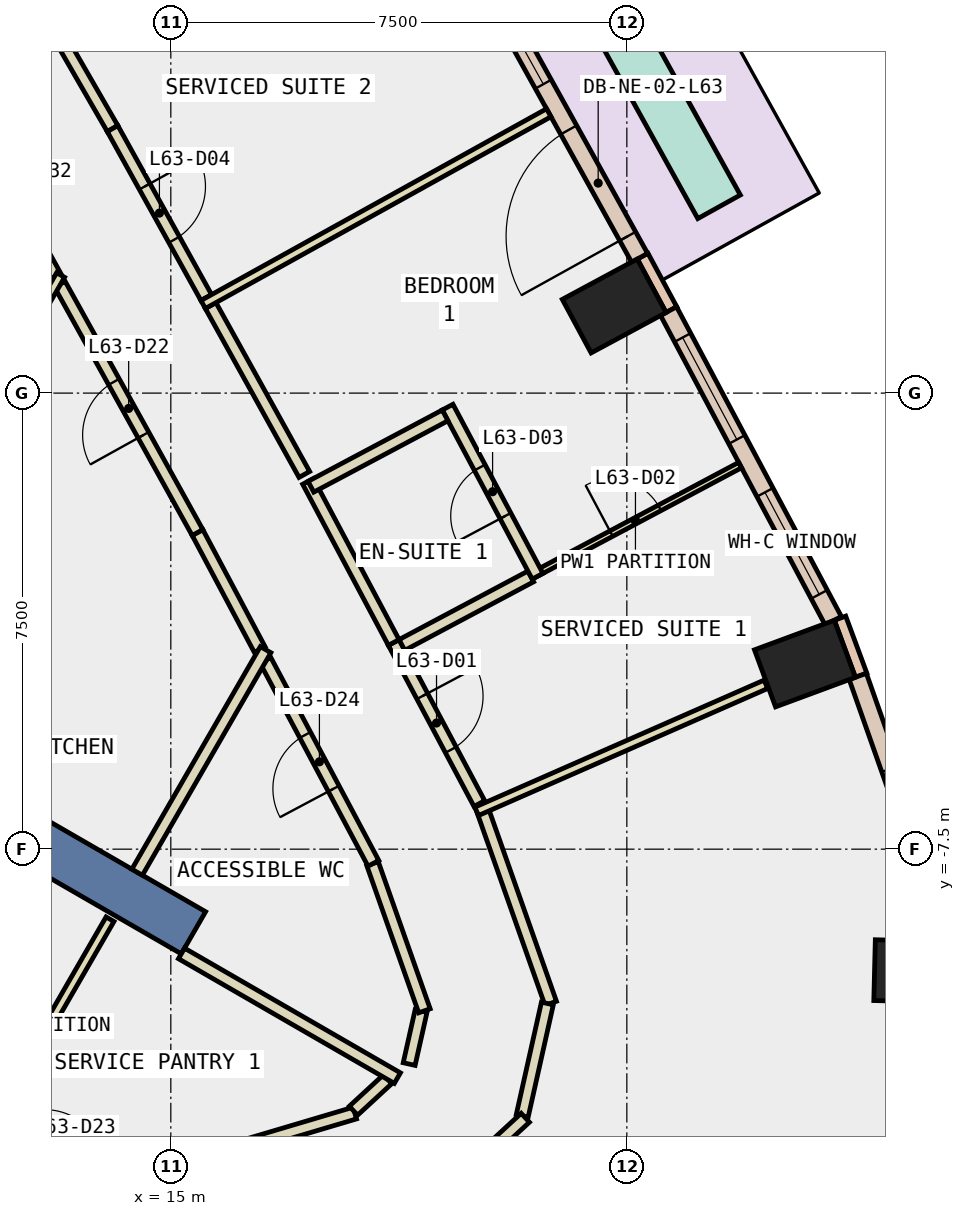
"""IFC4 building model, lengths in metres.
Left out: names, types, materials, properties, quantities, classifications, styles, units other than length and angle.
Written with IfcOpenShell. Run it as: python <this file> out.ifc"""

import sys

from ifc_helpers import new_model, si_unit, direction, frame, frame_2d, origin, origin_2d, place, context, subcontext, project, spatial, rectangle, extrude, element, fill, save


model = new_model("IFC4")
c1 = context("Model", 3, precision=1e-05, world=origin(), true_north=direction((0.0, 1.0)))
c2 = subcontext(c1, "Body", "Model", "MODEL_VIEW")
j1 = project(units=[si_unit("LENGTHUNIT", "METRE"), si_unit("PLANEANGLEUNIT", "RADIAN")], contexts=[c1])
p1 = place(None, origin())
s1 = spatial("IfcSite", under=j1, at=p1, CompositionType="ELEMENT")
p2 = place(p1, origin())
s2 = spatial("IfcBuilding", under=s1, at=p2, CompositionType="ELEMENT")
p3 = place(p2, frame((0.0, 0.0, 273.8)))
s3 = spatial("IfcBuildingStorey", under=s2, at=p3, CompositionType="ELEMENT", Elevation=273.8)
for number, where, z_axis, x_axis in (
    (1, (27.274, -9.507, -0.34), (0.0, 0.0, 1.0), (0.025, 1.0, 0.0)),
    (2, (25.429, -4.448, -0.34), (0.0, 0.0, 1.0), (-0.347, 0.938, 0.0)),
    (3, (22.292, 1.433, -0.34), (0.0, 0.0, 1.0), (-0.474, 0.881, 0.0)),
):
    element("IfcColumn", number, at=place(p3, frame(where, z_axis=z_axis, x_axis=x_axis)), inside=s3, PredefinedType="COLUMN", context=c2, shape_type="SweptSolid", body=[
        extrude(rectangle(XDim=1.0, YDim=1.4, at=origin_2d()), origin(), (0.0, 0.0, 1.0), 3.6),
    ])
p4 = place(p3, frame((7.578, -4.375, -0.34), z_axis=(0.0, 0.0, 1.0), x_axis=(0.866024315419, -0.5000018851, 0.0)))
e4 = element("IfcWall", 4, at=p4, inside=s3, PredefinedType="SHEAR", context=c2, shape_type="SweptSolid", body=[
    extrude(rectangle(XDim=9.0, YDim=0.8, at=frame_2d((4.5, 0.0))), origin(), (0.0, 0.0, 1.0), 3.6),
])
p5 = place(p3, frame((26.353, -4.64, 0.0), z_axis=(0.0, 0.0, 1.0), x_axis=(-0.346892928577, 0.937904737222, 0.0)))
e5 = element("IfcWall", 5, at=p5, inside=s3, PredefinedType="STANDARD", context=c2, shape_type="SweptSolid", body=[
    extrude(rectangle(XDim=1.0, YDim=0.2, at=frame_2d((0.5, 0.0))), origin(), (0.0, 0.0, 1.0), 3.26),
])
p6 = place(p3, frame((23.233, 1.372, 0.0), z_axis=(0.0, 0.0, 1.0), x_axis=(-0.473765014438, 0.880651299377, 0.0)))
e6 = element("IfcWall", 6, at=p6, inside=s3, PredefinedType="STANDARD", context=c2, shape_type="SweptSolid", body=[
    extrude(rectangle(XDim=1.0, YDim=0.2, at=frame_2d((0.5, 0.0))), origin(), (0.0, 0.0, 1.0), 3.26),
])
p7 = place(p3, frame((27.836, -9.021, 0.0), z_axis=(0.0, 0.0, 1.0), x_axis=(-0.332491532378, 0.943106240514, 0.0)))
e7 = element("IfcWall", 7, at=p7, inside=s3, PredefinedType="STANDARD", context=c2, shape_type="SweptSolid", body=[
    extrude(rectangle(XDim=4.625, YDim=0.3, at=frame_2d((2.312, 0.0))), origin(), (0.0, 0.0, 1.0), 3.26),
])
p8 = place(p7, frame((1.613, 0.0, 0.9)))
e8 = element("IfcOpeningElement", 8, at=p8, cuts=e7, PredefinedType="OPENING", context=c2, shape_type="SweptSolid", body=[
    extrude(rectangle(XDim=1.4, YDim=2.0, at=frame_2d((0.7, 1.0))), frame((0.0, 0.16, 0.0), z_axis=(0.0, -1.0, 0.0), x_axis=(1.0, 0.0, 0.0)), (0.0, 0.0, 1.0), 0.32),
])
p9 = place(p3, frame((25.895, -3.744, 0.0), z_axis=(0.0, 0.0, 1.0), x_axis=(-0.469691596427, 0.882830563724, 0.0)))
e9 = element("IfcWall", 9, at=p9, inside=s3, PredefinedType="STANDARD", context=c2, shape_type="SweptSolid", body=[
    extrude(rectangle(XDim=5.768, YDim=0.3, at=frame_2d((2.884, 0.0))), origin(), (0.0, 0.0, 1.0), 3.26),
])
p10 = place(p9, frame((0.492, 0.0, 0.9)))
e10 = element("IfcOpeningElement", 10, at=p10, cuts=e9, PredefinedType="OPENING", context=c2, shape_type="SweptSolid", body=[
    extrude(rectangle(XDim=1.9, YDim=2.0, at=frame_2d((0.95, 1.0))), frame((0.0, 0.16, 0.0), z_axis=(0.0, -1.0, 0.0), x_axis=(1.0, 0.0, 0.0)), (0.0, 0.0, 1.0), 0.32),
])
p11 = place(p9, frame((3.376, 0.0, 0.9)))
e11 = element("IfcOpeningElement", 11, at=p11, cuts=e9, PredefinedType="OPENING", context=c2, shape_type="SweptSolid", body=[
    extrude(rectangle(XDim=1.9, YDim=2.0, at=frame_2d((0.95, 1.0))), frame((0.0, 0.16, 0.0), z_axis=(0.0, -1.0, 0.0), x_axis=(1.0, 0.0, 0.0)), (0.0, 0.0, 1.0), 0.32),
])
p12 = place(p3, frame((22.71, 2.225, 0.0), z_axis=(0.0, 0.0, 1.0), x_axis=(-0.485049005017, 0.874486971162, 0.0)))
e12 = element("IfcWall", 12, at=p12, inside=s3, PredefinedType="STANDARD", context=c2, shape_type="SweptSolid", body=[
    extrude(rectangle(XDim=5.62, YDim=0.3, at=frame_2d((2.81, 0.0))), origin(), (0.0, 0.0, 1.0), 3.26),
])
p13 = place(p12, frame((0.405, 0.0, 0.0)))
e13 = element("IfcOpeningElement", 13, at=p13, cuts=e12, PredefinedType="OPENING", context=c2, shape_type="SweptSolid", body=[
    extrude(rectangle(XDim=2.0, YDim=2.4, at=frame_2d((1.0, 1.2))), frame((0.0, 0.16, 0.0), z_axis=(0.0, -1.0, 0.0), x_axis=(1.0, 0.0, 0.0)), (0.0, 0.0, 1.0), 0.32),
])
p14 = place(p12, frame((3.265, 0.0, 0.9)))
e14 = element("IfcOpeningElement", 14, at=p14, cuts=e12, PredefinedType="OPENING", context=c2, shape_type="SweptSolid", body=[
    extrude(rectangle(XDim=1.9, YDim=2.0, at=frame_2d((0.95, 1.0))), frame((0.0, 0.16, 0.0), z_axis=(0.0, -1.0, 0.0), x_axis=(1.0, 0.0, 0.0)), (0.0, 0.0, 1.0), 0.32),
])
p15 = place(p3, frame((24.017, 3.064, 0.0), z_axis=(0.0, 0.0, 1.0), x_axis=(-0.485053879715, 0.87448426731, 0.0)))
e15 = element("IfcWall", 15, at=p15, inside=s3, PredefinedType="STANDARD", context=c2, shape_type="SweptSolid", body=[
    extrude(rectangle(XDim=5.42, YDim=0.8, at=frame_2d((2.71, 0.0))), origin(), (0.0, 0.0, 1.0), 0.8),
])
p16 = place(p3, frame((13.102, 1.921, 0.0), z_axis=(0.0, 0.0, 1.0), x_axis=(-0.485065409582, 0.874477871891, 0.0)))
e16 = element("IfcWall", 16, at=p16, inside=s3, PredefinedType="PARTITIONING", context=c2, shape_type="SweptSolid", body=[
    extrude(rectangle(XDim=1.651, YDim=0.2, at=frame_2d((0.826, 0.0))), origin(), (0.0, 0.0, 1.0), 3.26),
])
p17 = place(p16, frame((0.325, 0.0, 0.0)))
e17 = element("IfcOpeningElement", 17, at=p17, cuts=e16, PredefinedType="OPENING", context=c2, shape_type="SweptSolid", body=[
    extrude(rectangle(XDim=1.0, YDim=2.1, at=frame_2d((0.5, 1.05))), frame((0.0, 0.11, 0.0), z_axis=(0.0, -1.0, 0.0), x_axis=(1.0, 0.0, 0.0)), (0.0, 0.0, 1.0), 0.22),
])
p18 = place(p3, frame((16.462, -4.217, 0.0), z_axis=(0.0, 0.0, 1.0), x_axis=(-0.469436447461, 0.882966263113, 0.0)))
e18 = element("IfcWall", 18, at=p18, inside=s3, PredefinedType="PARTITIONING", context=c2, shape_type="SweptSolid", body=[
    extrude(rectangle(XDim=2.179, YDim=0.2, at=frame_2d((1.09, 0.0))), origin(), (0.0, 0.0, 1.0), 3.26),
])
p19 = place(p3, frame((15.439, -2.293, 0.0), z_axis=(0.0, 0.0, 1.0), x_axis=(-0.485079003918, 0.874470331091, 0.0)))
e19 = element("IfcWall", 19, at=p19, inside=s3, PredefinedType="PARTITIONING", context=c2, shape_type="SweptSolid", body=[
    extrude(rectangle(XDim=4.669, YDim=0.2, at=frame_2d((2.334, 0.0))), origin(), (0.0, 0.0, 1.0), 3.26),
])
p20 = place(p19, frame((1.834, 0.0, 0.0)))
e20 = element("IfcOpeningElement", 20, at=p20, cuts=e19, PredefinedType="OPENING", context=c2, shape_type="SweptSolid", body=[
    extrude(rectangle(XDim=1.0, YDim=2.1, at=frame_2d((0.5, 1.05))), frame((0.0, 0.11, 0.0), z_axis=(0.0, -1.0, 0.0), x_axis=(1.0, 0.0, 0.0)), (0.0, 0.0, 1.0), 0.22),
])
p21 = place(p3, frame((15.177, -12.686, 0.0), z_axis=(0.0, 0.0, 1.0), x_axis=(0.958629704259, 0.284656090947, 0.0)))
e21 = element("IfcWall", 21, at=p21, inside=s3, PredefinedType="PARTITIONING", context=c2, shape_type="SweptSolid", body=[
    extrude(rectangle(XDim=2.972, YDim=0.2, at=frame_2d((1.486, 0.0))), origin(), (0.0, 0.0, 1.0), 3.26),
])
p22 = place(p3, frame((18.004, -11.801, 0.0), z_axis=(0.0, 0.0, 1.0), x_axis=(0.735268601872, 0.677775835436, 0.0)))
e22 = element("IfcWall", 22, at=p22, inside=s3, PredefinedType="PARTITIONING", context=c2, shape_type="SweptSolid", body=[
    extrude(rectangle(XDim=0.764, YDim=0.2, at=frame_2d((0.382, 0.0))), origin(), (0.0, 0.0, 1.0), 3.26),
])
p23 = place(p3, frame((18.92, -11.034, 0.0), z_axis=(0.0, 0.0, 1.0), x_axis=(0.219096654714, 0.975703159723, 0.0)))
e23 = element("IfcWall", 23, at=p23, inside=s3, PredefinedType="PARTITIONING", context=c2, shape_type="SweptSolid", body=[
    extrude(rectangle(XDim=0.895, YDim=0.2, at=frame_2d((0.447, 0.0))), origin(), (0.0, 0.0, 1.0), 3.26),
])
p24 = place(p3, frame((19.171, -10.158, 0.0), z_axis=(0.0, 0.0, 1.0), x_axis=(-0.332486504777, 0.943108012977, 0.0)))
e24 = element("IfcWall", 24, at=p24, inside=s3, PredefinedType="PARTITIONING", context=c2, shape_type="SweptSolid", body=[
    extrude(rectangle(XDim=2.565, YDim=0.2, at=frame_2d((1.282, 0.0))), origin(), (0.0, 0.0, 1.0), 3.26),
])
p25 = place(p3, frame((18.332, -7.733, 0.0), z_axis=(0.0, 0.0, 1.0), x_axis=(-0.469639737924, 0.882858152006, 0.0)))
e25 = element("IfcWall", 25, at=p25, inside=s3, PredefinedType="PARTITIONING", context=c2, shape_type="SweptSolid", body=[
    extrude(rectangle(XDim=3.782, YDim=0.2, at=frame_2d((1.891, 0.0))), origin(), (0.0, 0.0, 1.0), 3.26),
])
p26 = place(p25, frame((1.391, 0.0, 0.0)))
e26 = element("IfcOpeningElement", 26, at=p26, cuts=e25, PredefinedType="OPENING", context=c2, shape_type="SweptSolid", body=[
    extrude(rectangle(XDim=1.0, YDim=2.1, at=frame_2d((0.5, 1.05))), frame((0.0, 0.11, 0.0), z_axis=(0.0, -1.0, 0.0), x_axis=(1.0, 0.0, 0.0)), (0.0, 0.0, 1.0), 0.22),
])
p27 = place(p3, frame((20.113, -6.814, 0.0), z_axis=(0.0, 0.0, 1.0), x_axis=(0.332352648366, -0.943155192492, 0.0)))
e27 = element("IfcWall", 27, at=p27, inside=s3, PredefinedType="PARTITIONING", context=c2, shape_type="SweptSolid", body=[
    extrude(rectangle(XDim=3.415, YDim=0.2, at=frame_2d((1.708, 0.0))), origin(), (0.0, 0.0, 1.0), 3.26),
])
p28 = place(p3, frame((21.193, -10.038, 0.0), z_axis=(0.0, 0.0, 1.0), x_axis=(-0.218540107266, -0.975827967173, 0.0)))
e28 = element("IfcWall", 28, at=p28, inside=s3, PredefinedType="PARTITIONING", context=c2, shape_type="SweptSolid", body=[
    extrude(rectangle(XDim=1.895, YDim=0.2, at=frame_2d((0.947, 0.0))), origin(), (0.0, 0.0, 1.0), 3.26),
])
p29 = place(p3, frame((20.83, -11.917, 0.0), z_axis=(0.0, 0.0, 1.0), x_axis=(-0.735547704352, -0.67747293276, 0.0)))
e29 = element("IfcWall", 29, at=p29, inside=s3, PredefinedType="PARTITIONING", context=c2, shape_type="SweptSolid", body=[
    extrude(rectangle(XDim=2.463, YDim=0.2, at=frame_2d((1.232, 0.0))), origin(), (0.0, 0.0, 1.0), 3.26),
])
p30 = place(p3, frame((18.666, -4.101, 0.0), z_axis=(0.0, 0.0, 1.0), x_axis=(0.469341661158, -0.883016650523, 0.0)))
e30 = element("IfcWall", 30, at=p30, inside=s3, PredefinedType="PARTITIONING", context=c2, shape_type="SweptSolid", body=[
    extrude(rectangle(XDim=3.0, YDim=0.2, at=frame_2d((1.5, 0.0))), origin(), (0.0, 0.0, 1.0), 3.26),
])
p31 = place(p30, frame((1.0, 0.0, 0.0)))
e31 = element("IfcOpeningElement", 31, at=p31, cuts=e30, PredefinedType="OPENING", context=c2, shape_type="SweptSolid", body=[
    extrude(rectangle(XDim=1.0, YDim=2.1, at=frame_2d((0.5, 1.05))), frame((0.0, 0.11, 0.0), z_axis=(0.0, -1.0, 0.0), x_axis=(1.0, 0.0, 0.0)), (0.0, 0.0, 1.0), 0.22),
])
p32 = place(p3, frame((15.655, 1.44, 0.0), z_axis=(0.0, 0.0, 1.0), x_axis=(0.485107756493, -0.87445438108, 0.0)))
e32 = element("IfcWall", 32, at=p32, inside=s3, PredefinedType="PARTITIONING", context=c2, shape_type="SweptSolid", body=[
    extrude(rectangle(XDim=3.177, YDim=0.2, at=frame_2d((1.588, 0.0))), origin(), (0.0, 0.0, 1.0), 3.26),
])
p33 = place(p3, frame((17.257, -1.452, 0.0), z_axis=(0.0, 0.0, 1.0), x_axis=(0.469561695117, -0.882899662747, 0.0)))
e33 = element("IfcWall", 33, at=p33, inside=s3, PredefinedType="PARTITIONING", context=c2, shape_type="SweptSolid", body=[
    extrude(rectangle(XDim=3.0, YDim=0.2, at=frame_2d((1.5, 0.0))), origin(), (0.0, 0.0, 1.0), 3.26),
])
p34 = place(p3, frame((12.492, 7.035, 0.0), z_axis=(0.0, 0.0, 1.0), x_axis=(0.49999285859, -0.86602952684, 0.0)))
e34 = element("IfcWall", 34, at=p34, inside=s3, PredefinedType="PARTITIONING", context=c2, shape_type="SweptSolid", body=[
    extrude(rectangle(XDim=3.1, YDim=0.2, at=frame_2d((1.55, 0.0))), origin(), (0.0, 0.0, 1.0), 3.26),
])
p35 = place(p3, frame((14.042, 4.35, 0.0), z_axis=(0.0, 0.0, 1.0), x_axis=(0.484944791944, -0.874544766588, 0.0)))
e35 = element("IfcWall", 35, at=p35, inside=s3, PredefinedType="PARTITIONING", context=c2, shape_type="SweptSolid", body=[
    extrude(rectangle(XDim=3.178, YDim=0.2, at=frame_2d((1.589, 0.0))), origin(), (0.0, 0.0, 1.0), 3.26),
])
p36 = place(p35, frame((1.089, 0.0, 0.0)))
e36 = element("IfcOpeningElement", 36, at=p36, cuts=e35, PredefinedType="OPENING", context=c2, shape_type="SweptSolid", body=[
    extrude(rectangle(XDim=1.0, YDim=2.1, at=frame_2d((0.5, 1.05))), frame((0.0, 0.11, 0.0), z_axis=(0.0, -1.0, 0.0), x_axis=(1.0, 0.0, 0.0)), (0.0, 0.0, 1.0), 0.22),
])
p37 = place(p3, frame((14.0, -8.652, 0.0), z_axis=(0.0, 0.0, 1.0), x_axis=(-0.500067562424, -0.865986393087, 0.0)))
e37 = element("IfcWall", 37, at=p37, inside=s3, PredefinedType="PARTITIONING", context=c2, shape_type="SweptSolid", body=[
    extrude(rectangle(XDim=4.919, YDim=0.15, at=frame_2d((2.459, 0.0))), origin(), (0.0, 0.0, 1.0), 3.26),
])
p38 = place(p3, frame((16.559, -4.219, 0.0), z_axis=(0.0, 0.0, 1.0), x_axis=(-0.499997491977, -0.866026851788, 0.0)))
e38 = element("IfcWall", 38, at=p38, inside=s3, PredefinedType="PARTITIONING", context=c2, shape_type="SweptSolid", body=[
    extrude(rectangle(XDim=4.226, YDim=0.2, at=frame_2d((2.113, 0.0))), origin(), (0.0, 0.0, 1.0), 3.26),
])
p39 = place(p3, frame((15.176, -9.215, 0.0), z_axis=(0.0, 0.0, 1.0), x_axis=(0.866006068523, -0.500033488159, 0.0)))
e39 = element("IfcWall", 39, at=p39, inside=s3, PredefinedType="PARTITIONING", context=c2, shape_type="SweptSolid", body=[
    extrude(rectangle(XDim=4.099, YDim=0.2, at=frame_2d((2.05, 0.0))), origin(), (0.0, 0.0, 1.0), 3.26),
])
p40 = place(p3, frame((20.03, -6.878, 0.0), z_axis=(0.0, 0.0, 1.0), x_axis=(0.915616185053, 0.402053481104, 0.0)))
e40 = element("IfcWall", 40, at=p40, inside=s3, PredefinedType="PARTITIONING", context=c2, shape_type="SweptSolid", body=[
    extrude(rectangle(XDim=5.196, YDim=0.15, at=frame_2d((2.598, 0.0))), origin(), (0.0, 0.0, 1.0), 3.26),
])
p41 = place(p3, frame((20.92, -3.015, 0.0), z_axis=(0.0, 0.0, 1.0), x_axis=(0.882939758336, 0.469486297083, 0.0)))
e41 = element("IfcWall", 41, at=p41, inside=s3, PredefinedType="PARTITIONING", context=c2, shape_type="SweptSolid", body=[
    extrude(rectangle(XDim=3.9, YDim=0.1, at=frame_2d((1.95, 0.0))), origin(), (0.0, 0.0, 1.0), 3.26),
])
p42 = place(p41, frame((1.5, 0.0, 0.0)))
e42 = element("IfcOpeningElement", 42, at=p42, cuts=e41, PredefinedType="OPENING", context=c2, shape_type="SweptSolid", body=[
    extrude(rectangle(XDim=0.9, YDim=2.1, at=frame_2d((0.45, 1.05))), frame((0.0, 0.06, 0.0), z_axis=(0.0, -1.0, 0.0), x_axis=(1.0, 0.0, 0.0)), (0.0, 0.0, 1.0), 0.12),
])
p43 = place(p3, frame((18.801, -4.142, 0.0), z_axis=(0.0, 0.0, 1.0), x_axis=(0.882850852072, 0.469653460539, 0.0)))
e43 = element("IfcWall", 43, at=p43, inside=s3, PredefinedType="PARTITIONING", context=c2, shape_type="SweptSolid", body=[
    extrude(rectangle(XDim=2.4, YDim=0.2, at=frame_2d((1.2, 0.0))), origin(), (0.0, 0.0, 1.0), 3.26),
])
p44 = place(p3, frame((21.032, -3.012, 0.0), z_axis=(0.0, 0.0, 1.0), x_axis=(-0.469791613002, 0.882777344721, 0.0)))
e44 = element("IfcWall", 44, at=p44, inside=s3, PredefinedType="PARTITIONING", context=c2, shape_type="SweptSolid", body=[
    extrude(rectangle(XDim=3.15, YDim=0.2, at=frame_2d((1.575, 0.0))), origin(), (0.0, 0.0, 1.0), 3.26),
])
p45 = place(p44, frame((1.125, 0.0, 0.0)))
e45 = element("IfcOpeningElement", 45, at=p45, cuts=e44, PredefinedType="OPENING", context=c2, shape_type="SweptSolid", body=[
    extrude(rectangle(XDim=0.9, YDim=2.1, at=frame_2d((0.45, 1.05))), frame((0.0, 0.11, 0.0), z_axis=(0.0, -1.0, 0.0), x_axis=(1.0, 0.0, 0.0)), (0.0, 0.0, 1.0), 0.22),
])
p46 = place(p3, frame((19.511, -0.367, 0.0), z_axis=(0.0, 0.0, 1.0), x_axis=(-0.883014523832, -0.46934566228, 0.0)))
e46 = element("IfcWall", 46, at=p46, inside=s3, PredefinedType="PARTITIONING", context=c2, shape_type="SweptSolid", body=[
    extrude(rectangle(XDim=2.5, YDim=0.2, at=frame_2d((1.25, 0.0))), origin(), (0.0, 0.0, 1.0), 3.26),
])
p47 = place(p3, frame((15.532, 1.457, 0.0), z_axis=(0.0, 0.0, 1.0), x_axis=(0.874467143452, 0.485084750351, 0.0)))
e47 = element("IfcWall", 47, at=p47, inside=s3, PredefinedType="PARTITIONING", context=c2, shape_type="SweptSolid", body=[
    extrude(rectangle(XDim=6.5, YDim=0.15, at=frame_2d((3.25, 0.0))), origin(), (0.0, 0.0, 1.0), 3.26),
])
p48 = place(p3, frame((9.25, -4.879, 0.0), z_axis=(0.0, 0.0, 1.0), x_axis=(0.499999725187, 0.866025562448, 0.0)))
e48 = element("IfcWall", 48, at=p48, inside=s3, PredefinedType="PARTITIONING", context=c2, shape_type="SweptSolid", body=[
    extrude(rectangle(XDim=7.876, YDim=0.15, at=frame_2d((3.938, 0.0))), origin(), (0.0, 0.0, 1.0), 3.26),
])
p49 = place(p10, origin())
e49 = element("IfcWindow", 49, at=p49, inside=s3, PartitioningType="SINGLE_PANEL", PredefinedType="WINDOW", context=c2, shape_type="SweptSolid", body=[
    extrude(rectangle(XDim=1.9, YDim=2.0, at=frame_2d((0.95, 1.0))), frame((0.0, 0.03, 0.0), z_axis=(0.0, -1.0, 0.0), x_axis=(1.0, 0.0, 0.0)), (0.0, 0.0, 1.0), 0.06),
])
fill(e10, e49)
p50 = place(p11, origin())
e50 = element("IfcWindow", 50, at=p50, inside=s3, PartitioningType="SINGLE_PANEL", PredefinedType="WINDOW", context=c2, shape_type="SweptSolid", body=[
    extrude(rectangle(XDim=1.9, YDim=2.0, at=frame_2d((0.95, 1.0))), frame((0.0, 0.03, 0.0), z_axis=(0.0, -1.0, 0.0), x_axis=(1.0, 0.0, 0.0)), (0.0, 0.0, 1.0), 0.06),
])
fill(e11, e50)
p51 = place(p13, origin())
e51 = element("IfcDoor", 51, at=p51, inside=s3, OperationType="SLIDING_TO_LEFT", PredefinedType="DOOR", context=c2, shape_type="SweptSolid", body=[
    extrude(rectangle(XDim=2.0, YDim=2.4, at=frame_2d((1.0, 1.2))), frame((0.0, 0.025, 0.0), z_axis=(0.0, -1.0, 0.0), x_axis=(1.0, 0.0, 0.0)), (0.0, 0.0, 1.0), 0.05),
])
fill(e13, e51)
p52 = place(p14, origin())
e52 = element("IfcWindow", 52, at=p52, inside=s3, PartitioningType="SINGLE_PANEL", PredefinedType="WINDOW", context=c2, shape_type="SweptSolid", body=[
    extrude(rectangle(XDim=1.9, YDim=2.0, at=frame_2d((0.95, 1.0))), frame((0.0, 0.03, 0.0), z_axis=(0.0, -1.0, 0.0), x_axis=(1.0, 0.0, 0.0)), (0.0, 0.0, 1.0), 0.06),
])
fill(e14, e52)
p53 = place(p31, origin())
e53 = element("IfcDoor", 53, at=p53, inside=s3, OperationType="SINGLE_SWING_LEFT", PredefinedType="DOOR", context=c2, shape_type="SweptSolid", body=[
    extrude(rectangle(XDim=1.0, YDim=2.1, at=frame_2d((0.5, 1.05))), frame((0.0, 0.025, 0.0), z_axis=(0.0, -1.0, 0.0), x_axis=(1.0, 0.0, 0.0)), (0.0, 0.0, 1.0), 0.05),
])
fill(e31, e53)
p54 = place(p42, origin())
e54 = element("IfcDoor", 54, at=p54, inside=s3, OperationType="SINGLE_SWING_LEFT", PredefinedType="DOOR", context=c2, shape_type="SweptSolid", body=[
    extrude(rectangle(XDim=0.9, YDim=2.1, at=frame_2d((0.45, 1.05))), frame((0.0, 0.025, 0.0), z_axis=(0.0, -1.0, 0.0), x_axis=(1.0, 0.0, 0.0)), (0.0, 0.0, 1.0), 0.05),
])
fill(e42, e54)
p55 = place(p45, origin())
e55 = element("IfcDoor", 55, at=p55, inside=s3, OperationType="SINGLE_SWING_LEFT", PredefinedType="DOOR", context=c2, shape_type="SweptSolid", body=[
    extrude(rectangle(XDim=0.9, YDim=2.1, at=frame_2d((0.45, 1.05))), frame((0.0, 0.025, 0.0), z_axis=(0.0, -1.0, 0.0), x_axis=(1.0, 0.0, 0.0)), (0.0, 0.0, 1.0), 0.05),
])
fill(e45, e55)
p56 = place(p36, origin())
e56 = element("IfcDoor", 56, at=p56, inside=s3, OperationType="SINGLE_SWING_LEFT", PredefinedType="DOOR", context=c2, shape_type="SweptSolid", body=[
    extrude(rectangle(XDim=1.0, YDim=2.1, at=frame_2d((0.5, 1.05))), frame((0.0, 0.025, 0.0), z_axis=(0.0, -1.0, 0.0), x_axis=(1.0, 0.0, 0.0)), (0.0, 0.0, 1.0), 0.05),
])
fill(e36, e56)
p57 = place(p20, origin())
e57 = element("IfcDoor", 57, at=p57, inside=s3, OperationType="SINGLE_SWING_LEFT", PredefinedType="DOOR", context=c2, shape_type="SweptSolid", body=[
    extrude(rectangle(XDim=1.0, YDim=2.1, at=frame_2d((0.5, 1.05))), frame((0.0, 0.025, 0.0), z_axis=(0.0, -1.0, 0.0), x_axis=(1.0, 0.0, 0.0)), (0.0, 0.0, 1.0), 0.05),
])
fill(e20, e57)
p58 = place(p26, origin())
e58 = element("IfcDoor", 58, at=p58, inside=s3, OperationType="SINGLE_SWING_RIGHT", PredefinedType="DOOR", context=c2, shape_type="SweptSolid", body=[
    extrude(rectangle(XDim=1.0, YDim=2.1, at=frame_2d((0.5, 1.05))), frame((0.0, 0.025, 0.0), z_axis=(0.0, -1.0, 0.0), x_axis=(1.0, 0.0, 0.0)), (0.0, 0.0, 1.0), 0.05),
])
fill(e26, e58)
save(model, sys.argv[1])
